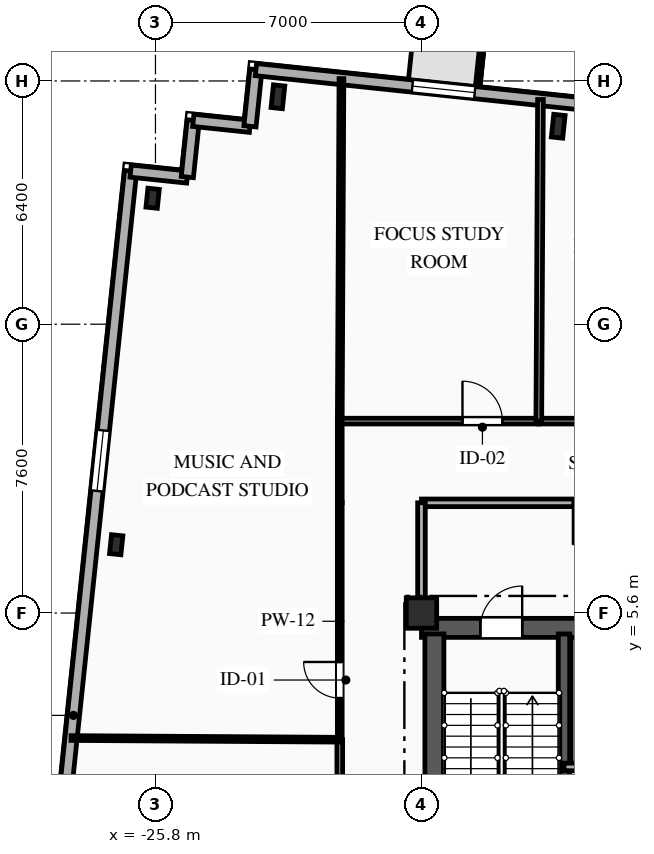
"""IFC4 building model, lengths in metres.
Left out: names, types, materials, properties, quantities, classifications, styles, units other than length and angle.
Written with IfcOpenShell. Run it as: python <this file> out.ifc"""

import sys

from ifc_helpers import new_model, si_unit, direction, frame, frame_2d, origin, origin_2d, place, context, subcontext, project, spatial, rectangle, i_section, extrude, element, fill, save


model = new_model("IFC4")
c1 = context("Model", 3, precision=1e-05, world=origin(), true_north=direction((0.0, 1.0)))
c2 = subcontext(c1, "Body", "Model", "MODEL_VIEW")
j1 = project(units=[si_unit("LENGTHUNIT", "METRE"), si_unit("PLANEANGLEUNIT", "RADIAN")], contexts=[c1])
p1 = place(None, origin())
s1 = spatial("IfcSite", under=j1, at=p1, CompositionType="ELEMENT")
p2 = place(p1, origin())
s2 = spatial("IfcBuilding", under=s1, at=p2, CompositionType="ELEMENT")
p3 = place(p2, frame((0.0, 0.0, 203.1)))
s3 = spatial("IfcBuildingStorey", under=s2, at=p3, CompositionType="ELEMENT", Elevation=203.1)
p4 = place(p3, frame((-18.8, 5.6, 0.0), z_axis=(0.0, 0.0, 1.0), x_axis=(1.0, 0.0, 0.0)))
e1 = element("IfcColumn", 1, at=p4, inside=s3, PredefinedType="COLUMN", context=c2, shape_type="SweptSolid", body=[
    extrude(rectangle(XDim=0.8, YDim=0.8, at=origin_2d()), origin(), (0.0, 0.0, 1.0), 3.35),
])
for number, where, z_axis, x_axis in (
    (2, (-15.201, 18.409, 0.0), (0.0, 0.0, 1.0), (0.995, -0.105, 0.0)),
    (3, (-22.577, 19.184, 0.0), (0.0, 0.0, 1.0), (0.995, -0.105, 0.0)),
):
    element("IfcColumn", number, at=place(p3, frame(where, z_axis=z_axis, x_axis=x_axis)), inside=s3, PredefinedType="COLUMN", context=c2, shape_type="SweptSolid", body=[
        extrude(i_section(OverallWidth=0.3, OverallDepth=0.6, WebThickness=0.015, FlangeThickness=0.03, FilletRadius=0.027, at=origin_2d()), origin(), (0.0, 0.0, 1.0), 3.35),
    ])
for number, where, z_axis, x_axis in (
    (4, (-25.875, 16.514, 0.0), (0.0, 0.0, 1.0), (0.995, -0.105, 0.0)),
    (5, (-26.833, 7.398, 0.0), (0.0, 0.0, 1.0), (0.995, -0.105, 0.0)),
):
    element("IfcColumn", number, at=place(p3, frame(where, z_axis=z_axis, x_axis=x_axis)), inside=s3, PredefinedType="COLUMN", context=c2, shape_type="SweptSolid", body=[
        extrude(i_section(OverallWidth=0.3, OverallDepth=0.5, WebThickness=0.014, FlangeThickness=0.028, FilletRadius=0.027, at=origin_2d()), origin(), (0.0, 0.0, 1.0), 3.35),
    ])
p5 = place(p3, frame((-29.463, -11.414, 0.0), z_axis=(0.0, 0.0, 1.0), x_axis=(0.104530779244, 0.994521651947, 0.0)))
e6 = element("IfcWall", 6, at=p5, inside=s3, PredefinedType="SOLIDWALL", context=c2, shape_type="SweptSolid", body=[
    extrude(rectangle(XDim=28.8, YDim=0.32, at=frame_2d((14.4, 0.0))), origin(), (0.0, 0.0, 1.0), 3.04),
])
p6 = place(p5, frame((6.355, 0.0, 0.85)))
e7 = element("IfcOpeningElement", 7, at=p6, cuts=e6, PredefinedType="OPENING", context=c2, shape_type="SweptSolid", body=[
    extrude(rectangle(XDim=1.65, YDim=1.85, at=frame_2d((0.825, 0.925))), frame((0.0, 0.17, 0.0), z_axis=(0.0, -1.0, 0.0), x_axis=(1.0, 0.0, 0.0)), (0.0, 0.0, 1.0), 0.34),
])
p7 = place(p5, frame((20.339, 0.0, 0.85)))
e8 = element("IfcOpeningElement", 8, at=p7, cuts=e6, PredefinedType="OPENING", context=c2, shape_type="SweptSolid", body=[
    extrude(rectangle(XDim=1.6, YDim=1.85, at=frame_2d((0.8, 0.925))), frame((0.0, 0.17, 0.0), z_axis=(0.0, -1.0, 0.0), x_axis=(1.0, 0.0, 0.0)), (0.0, 0.0, 1.0), 0.34),
])
p8 = place(p3, frame((-26.453, 17.229, 0.0), z_axis=(0.0, 0.0, 1.0), x_axis=(0.994508128223, -0.104659366031, 0.0)))
e9 = element("IfcWall", 9, at=p8, inside=s3, PredefinedType="SOLIDWALL", context=c2, shape_type="SweptSolid", body=[
    extrude(rectangle(XDim=1.5, YDim=0.32, at=frame_2d((0.75, 0.0))), origin(), (0.0, 0.0, 1.0), 3.04),
])
p9 = place(p3, frame((-24.961, 17.072, 0.0), z_axis=(0.0, 0.0, 1.0), x_axis=(0.104642427191, 0.994509910675, 0.0)))
e10 = element("IfcWall", 10, at=p9, inside=s3, PredefinedType="SOLIDWALL", context=c2, shape_type="SweptSolid", body=[
    extrude(rectangle(XDim=1.5, YDim=0.32, at=frame_2d((0.75, 0.0))), origin(), (0.0, 0.0, 1.0), 3.04),
])
p10 = place(p3, frame((-24.804, 18.563, 0.0), z_axis=(0.0, 0.0, 1.0), x_axis=(0.994508128223, -0.104659366031, 0.0)))
e11 = element("IfcWall", 11, at=p10, inside=s3, PredefinedType="SOLIDWALL", context=c2, shape_type="SweptSolid", body=[
    extrude(rectangle(XDim=1.5, YDim=0.32, at=frame_2d((0.75, 0.0))), origin(), (0.0, 0.0, 1.0), 3.04),
])
p11 = place(p3, frame((-23.312, 18.406, 0.0), z_axis=(0.0, 0.0, 1.0), x_axis=(0.104481464157, 0.994526834051, 0.0)))
e12 = element("IfcWall", 12, at=p11, inside=s3, PredefinedType="SOLIDWALL", context=c2, shape_type="SweptSolid", body=[
    extrude(rectangle(XDim=1.5, YDim=0.32, at=frame_2d((0.75, 0.0))), origin(), (0.0, 0.0, 1.0), 3.04),
])
p12 = place(p3, frame((-23.156, 19.898, 0.0), z_axis=(0.0, 0.0, 1.0), x_axis=(0.994522001802, -0.104527450613, 0.0)))
e13 = element("IfcWall", 13, at=p12, inside=s3, PredefinedType="SOLIDWALL", context=c2, shape_type="SweptSolid", body=[
    extrude(rectangle(XDim=45.8, YDim=0.32, at=frame_2d((22.9, 0.0))), origin(), (0.0, 0.0, 1.0), 3.04),
])
p13 = place(p12, frame((4.139, 0.0, 0.85)))
e14 = element("IfcOpeningElement", 14, at=p13, cuts=e13, PredefinedType="OPENING", context=c2, shape_type="SweptSolid", body=[
    extrude(rectangle(XDim=1.65, YDim=1.85, at=frame_2d((0.825, 0.925))), frame((0.0, 0.17, 0.0), z_axis=(0.0, -1.0, 0.0), x_axis=(1.0, 0.0, 0.0)), (0.0, 0.0, 1.0), 0.34),
])
p14 = place(p12, frame((9.384, 0.0, 0.85)))
e15 = element("IfcOpeningElement", 15, at=p14, cuts=e13, PredefinedType="OPENING", context=c2, shape_type="SweptSolid", body=[
    extrude(rectangle(XDim=1.65, YDim=1.85, at=frame_2d((0.825, 0.925))), frame((0.0, 0.17, 0.0), z_axis=(0.0, -1.0, 0.0), x_axis=(1.0, 0.0, 0.0)), (0.0, 0.0, 1.0), 0.34),
])
p15 = place(p12, frame((18.497, 0.0, 0.85)))
e16 = element("IfcOpeningElement", 16, at=p15, cuts=e13, PredefinedType="OPENING", context=c2, shape_type="SweptSolid", body=[
    extrude(rectangle(XDim=1.6, YDim=1.85, at=frame_2d((0.8, 0.925))), frame((0.0, 0.17, 0.0), z_axis=(0.0, -1.0, 0.0), x_axis=(1.0, 0.0, 0.0)), (0.0, 0.0, 1.0), 0.34),
])
p16 = place(p12, frame((27.525, 0.0, 0.85)))
e17 = element("IfcOpeningElement", 17, at=p16, cuts=e13, PredefinedType="OPENING", context=c2, shape_type="SweptSolid", body=[
    extrude(rectangle(XDim=2.2, YDim=1.85, at=frame_2d((1.1, 0.925))), frame((0.0, 0.17, 0.0), z_axis=(0.0, -1.0, 0.0), x_axis=(1.0, 0.0, 0.0)), (0.0, 0.0, 1.0), 0.34),
])
p17 = place(p12, frame((38.329, 0.0, 0.85)))
e18 = element("IfcOpeningElement", 18, at=p17, cuts=e13, PredefinedType="OPENING", context=c2, shape_type="SweptSolid", body=[
    extrude(rectangle(XDim=1.65, YDim=1.85, at=frame_2d((0.825, 0.925))), frame((0.0, 0.17, 0.0), z_axis=(0.0, -1.0, 0.0), x_axis=(1.0, 0.0, 0.0)), (0.0, 0.0, 1.0), 0.34),
])
p18 = place(p3, frame((-18.8, 5.21, 0.0), z_axis=(0.0, 0.0, 1.0), x_axis=(1.0, 0.0, 0.0)))
e19 = element("IfcWall", 19, at=p18, inside=s3, PredefinedType="SHEAR", context=c2, shape_type="SweptSolid", body=[
    extrude(rectangle(XDim=9.6, YDim=0.5, at=frame_2d((4.8, 0.0))), origin(), (0.0, 0.0, 1.0), 3.04),
])
p19 = place(p18, frame((1.55, 0.0, 0.0)))
e20 = element("IfcOpeningElement", 20, at=p19, cuts=e19, PredefinedType="OPENING", context=c2, shape_type="SweptSolid", body=[
    extrude(rectangle(XDim=1.1, YDim=2.15, at=frame_2d((0.55, 1.075))), frame((0.0, 0.26, 0.0), z_axis=(0.0, -1.0, 0.0), x_axis=(1.0, 0.0, 0.0)), (0.0, 0.0, 1.0), 0.52),
])
p20 = place(p18, frame((4.775, 0.0, 0.0)))
e21 = element("IfcOpeningElement", 21, at=p20, cuts=e19, PredefinedType="OPENING", context=c2, shape_type="SweptSolid", body=[
    extrude(rectangle(XDim=1.05, YDim=2.1, at=frame_2d((0.525, 1.05))), frame((0.0, 0.26, 0.0), z_axis=(0.0, -1.0, 0.0), x_axis=(1.0, 0.0, 0.0)), (0.0, 0.0, 1.0), 0.52),
])
p21 = place(p3, frame((-18.46, -5.05, 0.0), z_axis=(0.0, 0.0, 1.0), x_axis=(0.0, 1.0, 0.0)))
e22 = element("IfcWall", 22, at=p21, inside=s3, PredefinedType="SHEAR", context=c2, shape_type="SweptSolid", body=[
    extrude(rectangle(XDim=10.1, YDim=0.5, at=frame_2d((5.05, 0.0))), origin(), (0.0, 0.0, 1.0), 3.04),
])
p22 = place(p3, frame((-15.05, -5.05, 0.0), z_axis=(0.0, 0.0, 1.0), x_axis=(0.0, 1.0, 0.0)))
e23 = element("IfcWall", 23, at=p22, inside=s3, PredefinedType="SHEAR", context=c2, shape_type="SweptSolid", body=[
    extrude(rectangle(XDim=10.1, YDim=0.3, at=frame_2d((5.05, 0.0))), origin(), (0.0, 0.0, 1.0), 3.04),
])
p23 = place(p3, frame((-12.0, 8.5, 0.0), z_axis=(0.0, 0.0, 1.0), x_axis=(-1.0, 0.0, 0.0)))
e24 = element("IfcWall", 24, at=p23, inside=s3, PredefinedType="PARTITIONING", context=c2, shape_type="SweptSolid", body=[
    extrude(rectangle(XDim=6.8, YDim=0.2, at=frame_2d((3.4, 0.0))), origin(), (0.0, 0.0, 1.0), 3.04),
])
p24 = place(p23, frame((1.715, 0.0, 0.0)))
e25 = element("IfcOpeningElement", 25, at=p24, cuts=e24, PredefinedType="OPENING", context=c2, shape_type="SweptSolid", body=[
    extrude(rectangle(XDim=1.1, YDim=2.15, at=frame_2d((0.55, 1.075))), frame((0.0, 0.11, 0.0), z_axis=(0.0, -1.0, 0.0), x_axis=(1.0, 0.0, 0.0)), (0.0, 0.0, 1.0), 0.22),
])
p25 = place(p3, frame((-18.8, 8.5, 0.0), z_axis=(0.0, 0.0, 1.0), x_axis=(0.0, -1.0, 0.0)))
e26 = element("IfcWall", 26, at=p25, inside=s3, PredefinedType="PARTITIONING", context=c2, shape_type="SweptSolid", body=[
    extrude(rectangle(XDim=2.9, YDim=0.2, at=frame_2d((1.45, 0.0))), origin(), (0.0, 0.0, 1.0), 2.665),
])
p26 = place(p3, frame((-20.95, 8.5, 0.0), z_axis=(0.0, 0.0, 1.0), x_axis=(0.0, 1.0, 0.0)))
e27 = element("IfcWall", 27, at=p26, inside=s3, PredefinedType="PARTITIONING", context=c2, shape_type="SweptSolid", body=[
    extrude(rectangle(XDim=2.15, YDim=0.125, at=frame_2d((1.075, 0.0))), origin(), (0.0, 0.0, 1.0), 3.04),
])
p27 = place(p3, frame((-20.95, 10.65, 0.0), z_axis=(0.0, 0.0, 1.0), x_axis=(1.0, 0.0, 0.0)))
e28 = element("IfcWall", 28, at=p27, inside=s3, PredefinedType="PARTITIONING", context=c2, shape_type="SweptSolid", body=[
    extrude(rectangle(XDim=5.238, YDim=0.15, at=frame_2d((2.619, 0.0))), origin(), (0.0, 0.0, 1.0), 3.04),
])
p28 = place(p27, frame((3.229, 0.0, 0.0)))
e29 = element("IfcOpeningElement", 29, at=p28, cuts=e28, PredefinedType="OPENING", context=c2, shape_type="SweptSolid", body=[
    extrude(rectangle(XDim=1.05, YDim=2.15, at=frame_2d((0.525, 1.075))), frame((0.0, 0.085, 0.0), z_axis=(0.0, -1.0, 0.0), x_axis=(1.0, 0.0, 0.0)), (0.0, 0.0, 1.0), 0.17),
])
p29 = place(p3, frame((-15.712, 10.65, 0.0), z_axis=(0.0, 0.0, 1.0), x_axis=(1.0, 0.0, 0.0)))
e30 = element("IfcWall", 30, at=p29, inside=s3, PredefinedType="PARTITIONING", context=c2, shape_type="SweptSolid", body=[
    extrude(rectangle(XDim=5.237, YDim=0.15, at=frame_2d((2.619, 0.0))), origin(), (0.0, 0.0, 1.0), 3.04),
])
p30 = place(p29, frame((1.337, 0.0, 0.0)))
e31 = element("IfcOpeningElement", 31, at=p30, cuts=e30, PredefinedType="OPENING", context=c2, shape_type="SweptSolid", body=[
    extrude(rectangle(XDim=1.05, YDim=2.15, at=frame_2d((0.525, 1.075))), frame((0.0, 0.085, 0.0), z_axis=(0.0, -1.0, 0.0), x_axis=(1.0, 0.0, 0.0)), (0.0, 0.0, 1.0), 0.17),
])
p31 = place(p3, frame((-20.95, -5.6, 0.0), z_axis=(0.0, 0.0, 1.0), x_axis=(0.0, 1.0, 0.0)))
e32 = element("IfcWall", 32, at=p31, inside=s3, PredefinedType="PARTITIONING", context=c2, shape_type="SweptSolid", body=[
    extrude(rectangle(XDim=7.867, YDim=0.15, at=frame_2d((3.934, 0.0))), origin(), (0.0, 0.0, 1.0), 3.04),
])
p32 = place(p31, frame((4.823, 0.0, 0.0)))
e33 = element("IfcOpeningElement", 33, at=p32, cuts=e32, PredefinedType="OPENING", context=c2, shape_type="SweptSolid", body=[
    extrude(rectangle(XDim=1.05, YDim=2.15, at=frame_2d((0.525, 1.075))), frame((0.0, 0.085, 0.0), z_axis=(0.0, -1.0, 0.0), x_axis=(1.0, 0.0, 0.0)), (0.0, 0.0, 1.0), 0.17),
])
p33 = place(p3, frame((-20.95, 2.267, 0.0), z_axis=(0.0, 0.0, 1.0), x_axis=(0.0, 1.0, 0.0)))
e34 = element("IfcWall", 34, at=p33, inside=s3, PredefinedType="PARTITIONING", context=c2, shape_type="SweptSolid", body=[
    extrude(rectangle(XDim=6.233, YDim=0.125, at=frame_2d((3.116, 0.0))), origin(), (0.0, 0.0, 1.0), 3.04),
])
p34 = place(p33, frame((1.095, 0.0, 0.0)))
e35 = element("IfcOpeningElement", 35, at=p34, cuts=e34, PredefinedType="OPENING", context=c2, shape_type="SweptSolid", body=[
    extrude(rectangle(XDim=0.95, YDim=2.1, at=frame_2d((0.475, 1.05))), frame((0.0, 0.073, 0.0), z_axis=(0.0, -1.0, 0.0), x_axis=(1.0, 0.0, 0.0)), (0.0, 0.0, 1.0), 0.145),
])
p35 = place(p3, frame((-28.021, 2.311, 0.0), z_axis=(0.0, 0.0, 1.0), x_axis=(0.99998090118, -0.006180394355, 0.0)))
e36 = element("IfcWall", 36, at=p35, inside=s3, PredefinedType="PARTITIONING", context=c2, shape_type="SweptSolid", body=[
    extrude(rectangle(XDim=7.071, YDim=0.125, at=frame_2d((3.536, 0.0))), origin(), (0.0, 0.0, 1.0), 3.04),
])
p36 = place(p3, frame((-20.906, 19.662, 0.0), z_axis=(0.0, 0.0, 1.0), x_axis=(-0.004876272857, -0.999988110911, 0.0)))
e37 = element("IfcWall", 37, at=p36, inside=s3, PredefinedType="PARTITIONING", context=c2, shape_type="SweptSolid", body=[
    extrude(rectangle(XDim=9.012, YDim=0.125, at=frame_2d((4.506, 0.0))), origin(), (0.0, 0.0, 1.0), 2.665),
])
p37 = place(p3, frame((-15.669, 19.112, 0.0), z_axis=(0.0, 0.0, 1.0), x_axis=(-0.005164534834, -0.999986663701, 0.0)))
e38 = element("IfcWall", 38, at=p37, inside=s3, PredefinedType="PARTITIONING", context=c2, shape_type="SweptSolid", body=[
    extrude(rectangle(XDim=8.462, YDim=0.15, at=frame_2d((4.231, 0.0))), origin(), (0.0, 0.0, 1.0), 2.665),
])
p38 = place(p3, frame((-15.05, 1.55, 0.0), z_axis=(0.0, 0.0, 1.0), x_axis=(1.0, 0.0, 0.0)))
e39 = element("IfcWall", 39, at=p38, inside=s3, PredefinedType="PARTITIONING", context=c2, shape_type="SweptSolid", body=[
    extrude(rectangle(XDim=2.9, YDim=0.2, at=frame_2d((1.45, 0.0))), origin(), (0.0, 0.0, 1.0), 3.04),
])
p39 = place(p7, origin())
e40 = element("IfcWindow", 40, at=p39, inside=s3, PartitioningType="SINGLE_PANEL", PredefinedType="WINDOW", context=c2, shape_type="SweptSolid", body=[
    extrude(rectangle(XDim=1.6, YDim=1.85, at=frame_2d((0.8, 0.925))), frame((0.0, 0.03, 0.0), z_axis=(0.0, -1.0, 0.0), x_axis=(1.0, 0.0, 0.0)), (0.0, 0.0, 1.0), 0.06),
])
fill(e8, e40)
p40 = place(p13, origin())
e41 = element("IfcWindow", 41, at=p40, inside=s3, PartitioningType="SINGLE_PANEL", PredefinedType="WINDOW", context=c2, shape_type="SweptSolid", body=[
    extrude(rectangle(XDim=1.65, YDim=1.85, at=frame_2d((0.825, 0.925))), frame((0.0, 0.03, 0.0), z_axis=(0.0, -1.0, 0.0), x_axis=(1.0, 0.0, 0.0)), (0.0, 0.0, 1.0), 0.06),
])
fill(e14, e41)
p41 = place(p19, origin())
e42 = element("IfcDoor", 42, at=p41, inside=s3, OperationType="SINGLE_SWING_RIGHT", PredefinedType="DOOR", context=c2, shape_type="SweptSolid", body=[
    extrude(rectangle(XDim=1.1, YDim=2.15, at=frame_2d((0.55, 1.075))), frame((0.0, 0.025, 0.0), z_axis=(0.0, -1.0, 0.0), x_axis=(1.0, 0.0, 0.0)), (0.0, 0.0, 1.0), 0.05),
])
fill(e20, e42)
p42 = place(p24, origin())
e43 = element("IfcDoor", 43, at=p42, inside=s3, OperationType="SINGLE_SWING_RIGHT", PredefinedType="DOOR", context=c2, shape_type="SweptSolid", body=[
    extrude(rectangle(XDim=1.1, YDim=2.15, at=frame_2d((0.55, 1.075))), frame((0.0, 0.025, 0.0), z_axis=(0.0, -1.0, 0.0), x_axis=(1.0, 0.0, 0.0)), (0.0, 0.0, 1.0), 0.05),
])
fill(e25, e43)
p43 = place(p28, origin())
e44 = element("IfcDoor", 44, at=p43, inside=s3, OperationType="SINGLE_SWING_LEFT", PredefinedType="DOOR", context=c2, shape_type="SweptSolid", body=[
    extrude(rectangle(XDim=1.05, YDim=2.15, at=frame_2d((0.525, 1.075))), frame((0.0, 0.025, 0.0), z_axis=(0.0, -1.0, 0.0), x_axis=(1.0, 0.0, 0.0)), (0.0, 0.0, 1.0), 0.05),
])
fill(e29, e44)
p44 = place(p34, origin())
e45 = element("IfcDoor", 45, at=p44, inside=s3, OperationType="SINGLE_SWING_RIGHT", PredefinedType="DOOR", context=c2, shape_type="SweptSolid", body=[
    extrude(rectangle(XDim=0.95, YDim=2.1, at=frame_2d((0.475, 1.05))), frame((0.0, 0.025, 0.0), z_axis=(0.0, -1.0, 0.0), x_axis=(1.0, 0.0, 0.0)), (0.0, 0.0, 1.0), 0.05),
])
fill(e35, e45)
save(model, sys.argv[1])
